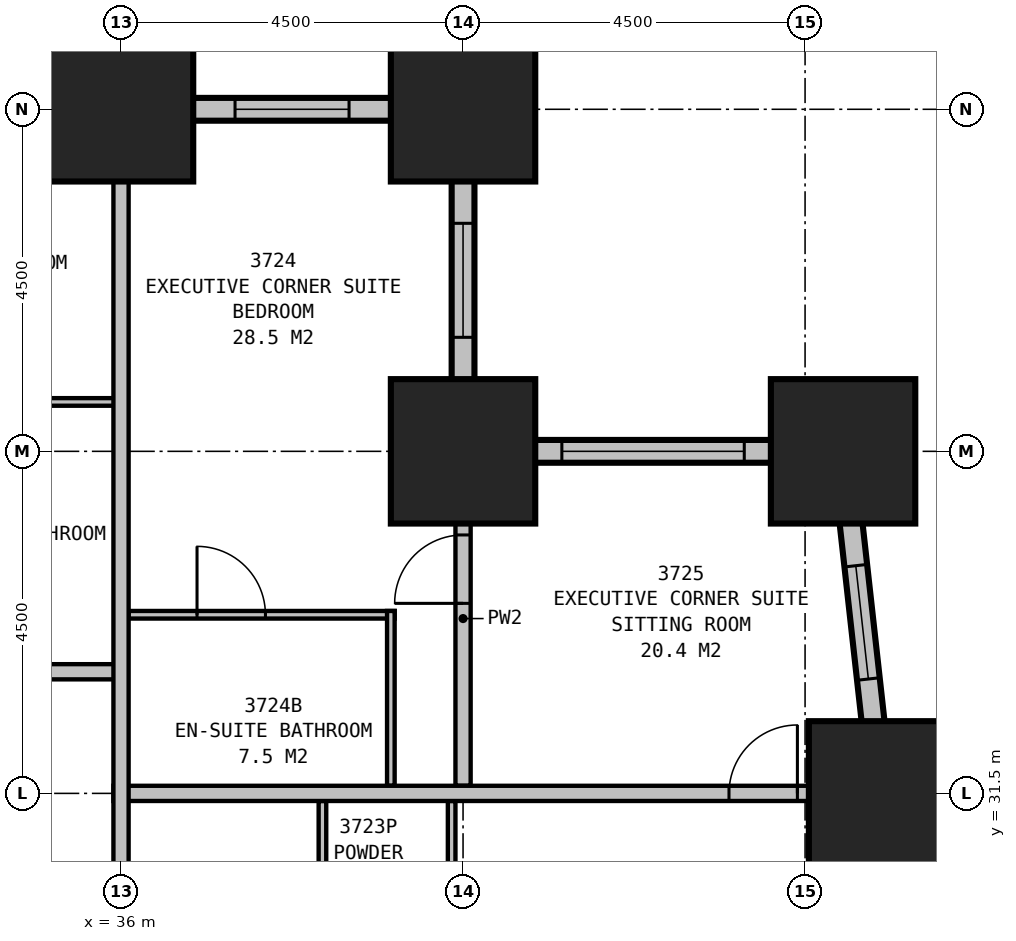
"""IFC4 building model, lengths in metres.
Left out: names, types, materials, properties, quantities, classifications, styles, units other than length and angle.
Written with IfcOpenShell. Run it as: python <this file> out.ifc"""

import sys

from ifc_helpers import new_model, si_unit, direction, frame, frame_2d, origin, origin_2d, place, context, subcontext, project, spatial, rectangle, extrude, element, fill, save


model = new_model("IFC4")
c1 = context("Model", 3, precision=1e-05, world=origin(), true_north=direction((0.0, 1.0)))
c2 = subcontext(c1, "Body", "Model", "MODEL_VIEW")
j1 = project(units=[si_unit("LENGTHUNIT", "METRE"), si_unit("PLANEANGLEUNIT", "RADIAN")], contexts=[c1])
p1 = place(None, origin())
s1 = spatial("IfcSite", under=j1, at=p1, CompositionType="ELEMENT")
p2 = place(p1, origin())
s2 = spatial("IfcBuilding", under=s1, at=p2, CompositionType="ELEMENT")
p3 = place(p2, frame((0.0, 0.0, 142.4)))
s3 = spatial("IfcBuildingStorey", under=s2, at=p3, CompositionType="ELEMENT", Elevation=142.4)
for number, where, z_axis, x_axis in (
    (1, (46.0, 31.5, 0.0), (0.0, 0.0, 1.0), (1.0, 0.0, 0.0)),
    (2, (45.5, 36.0, 0.0), (0.0, 0.0, 1.0), (1.0, 0.0, 0.0)),
    (3, (40.5, 36.0, 0.0), (0.0, 0.0, 1.0), (1.0, 0.0, 0.0)),
    (4, (40.5, 40.5, 0.0), (0.0, 0.0, 1.0), (1.0, 0.0, 0.0)),
    (5, (36.0, 40.5, 0.0), (0.0, 0.0, 1.0), (1.0, 0.0, 0.0)),
):
    element("IfcColumn", number, at=place(p3, frame(where, z_axis=z_axis, x_axis=x_axis)), inside=s3, PredefinedType="COLUMN", context=c2, shape_type="SweptSolid", body=[
        extrude(rectangle(XDim=1.9, YDim=1.9, at=origin_2d()), origin(), (0.0, 0.0, 1.0), 3.5),
    ])
p4 = place(p3, frame((49.017, 4.351, 0.0), z_axis=(0.0, 0.0, 1.0), x_axis=(-0.110433201132, 0.993883548555, 0.0)))
e6 = element("IfcWall", 6, at=p4, inside=s3, PredefinedType="STANDARD", context=c2, shape_type="SweptSolid", body=[
    extrude(rectangle(XDim=31.994, YDim=0.3, at=frame_2d((15.997, 0.0))), origin(), (0.0, 0.0, 1.0), 2.1),
])
p5 = place(p4, frame((1.664, 0.0, 0.5)))
e7 = element("IfcOpeningElement", 7, at=p5, cuts=e6, PredefinedType="OPENING", context=c2, shape_type="SweptSolid", body=[
    extrude(rectangle(XDim=1.5, YDim=1.4, at=frame_2d((0.75, 0.7))), frame((0.0, 0.16, 0.0), z_axis=(0.0, -1.0, 0.0), x_axis=(1.0, 0.0, 0.0)), (0.0, 0.0, 1.0), 0.32),
])
p6 = place(p4, frame((6.192, 0.0, 0.5)))
e8 = element("IfcOpeningElement", 8, at=p6, cuts=e6, PredefinedType="OPENING", context=c2, shape_type="SweptSolid", body=[
    extrude(rectangle(XDim=1.5, YDim=1.4, at=frame_2d((0.75, 0.7))), frame((0.0, 0.16, 0.0), z_axis=(0.0, -1.0, 0.0), x_axis=(1.0, 0.0, 0.0)), (0.0, 0.0, 1.0), 0.32),
])
p7 = place(p4, frame((10.719, 0.0, 0.5)))
e9 = element("IfcOpeningElement", 9, at=p7, cuts=e6, PredefinedType="OPENING", context=c2, shape_type="SweptSolid", body=[
    extrude(rectangle(XDim=1.5, YDim=1.4, at=frame_2d((0.75, 0.7))), frame((0.0, 0.16, 0.0), z_axis=(0.0, -1.0, 0.0), x_axis=(1.0, 0.0, 0.0)), (0.0, 0.0, 1.0), 0.32),
])
p8 = place(p4, frame((15.247, 0.0, 0.5)))
e10 = element("IfcOpeningElement", 10, at=p8, cuts=e6, PredefinedType="OPENING", context=c2, shape_type="SweptSolid", body=[
    extrude(rectangle(XDim=1.5, YDim=1.4, at=frame_2d((0.75, 0.7))), frame((0.0, 0.16, 0.0), z_axis=(0.0, -1.0, 0.0), x_axis=(1.0, 0.0, 0.0)), (0.0, 0.0, 1.0), 0.32),
])
p9 = place(p4, frame((19.775, 0.0, 0.5)))
e11 = element("IfcOpeningElement", 11, at=p9, cuts=e6, PredefinedType="OPENING", context=c2, shape_type="SweptSolid", body=[
    extrude(rectangle(XDim=1.5, YDim=1.4, at=frame_2d((0.75, 0.7))), frame((0.0, 0.16, 0.0), z_axis=(0.0, -1.0, 0.0), x_axis=(1.0, 0.0, 0.0)), (0.0, 0.0, 1.0), 0.32),
])
p10 = place(p4, frame((24.302, 0.0, 0.5)))
e12 = element("IfcOpeningElement", 12, at=p10, cuts=e6, PredefinedType="OPENING", context=c2, shape_type="SweptSolid", body=[
    extrude(rectangle(XDim=1.5, YDim=1.4, at=frame_2d((0.75, 0.7))), frame((0.0, 0.16, 0.0), z_axis=(0.0, -1.0, 0.0), x_axis=(1.0, 0.0, 0.0)), (0.0, 0.0, 1.0), 0.32),
])
p11 = place(p4, frame((28.83, 0.0, 0.5)))
e13 = element("IfcOpeningElement", 13, at=p11, cuts=e6, PredefinedType="OPENING", context=c2, shape_type="SweptSolid", body=[
    extrude(rectangle(XDim=1.5, YDim=1.4, at=frame_2d((0.75, 0.7))), frame((0.0, 0.16, 0.0), z_axis=(0.0, -1.0, 0.0), x_axis=(1.0, 0.0, 0.0)), (0.0, 0.0, 1.0), 0.32),
])
p12 = place(p3, frame((45.65, 36.0, 0.0), z_axis=(0.0, 0.0, 1.0), x_axis=(-1.0, 0.0, 0.0)))
e14 = element("IfcWall", 14, at=p12, inside=s3, PredefinedType="STANDARD", context=c2, shape_type="SweptSolid", body=[
    extrude(rectangle(XDim=5.3, YDim=0.3, at=frame_2d((2.65, 0.0))), origin(), (0.0, 0.0, 1.0), 2.1),
])
p13 = place(p12, frame((1.45, 0.0, 0.5)))
e15 = element("IfcOpeningElement", 15, at=p13, cuts=e14, PredefinedType="OPENING", context=c2, shape_type="SweptSolid", body=[
    extrude(rectangle(XDim=2.4, YDim=1.4, at=frame_2d((1.2, 0.7))), frame((0.0, 0.16, 0.0), z_axis=(0.0, -1.0, 0.0), x_axis=(1.0, 0.0, 0.0)), (0.0, 0.0, 1.0), 0.32),
])
p14 = place(p3, frame((40.5, 35.85, 0.0), z_axis=(0.0, 0.0, 1.0), x_axis=(0.0, 1.0, 0.0)))
e16 = element("IfcWall", 16, at=p14, inside=s3, PredefinedType="STANDARD", context=c2, shape_type="SweptSolid", body=[
    extrude(rectangle(XDim=4.8, YDim=0.3, at=frame_2d((2.4, 0.0))), origin(), (0.0, 0.0, 1.0), 2.1),
])
p15 = place(p14, frame((1.65, 0.0, 0.5)))
e17 = element("IfcOpeningElement", 17, at=p15, cuts=e16, PredefinedType="OPENING", context=c2, shape_type="SweptSolid", body=[
    extrude(rectangle(XDim=1.5, YDim=1.4, at=frame_2d((0.75, 0.7))), frame((0.0, 0.16, 0.0), z_axis=(0.0, -1.0, 0.0), x_axis=(1.0, 0.0, 0.0)), (0.0, 0.0, 1.0), 0.32),
])
p16 = place(p3, frame((40.65, 40.5, 0.0), z_axis=(0.0, 0.0, 1.0), x_axis=(-1.0, 0.0, 0.0)))
e18 = element("IfcWall", 18, at=p16, inside=s3, PredefinedType="STANDARD", context=c2, shape_type="SweptSolid", body=[
    extrude(rectangle(XDim=31.8, YDim=0.3, at=frame_2d((15.9, 0.0))), origin(), (0.0, 0.0, 1.0), 2.1),
])
p17 = place(p16, frame((1.65, 0.0, 0.5)))
e19 = element("IfcOpeningElement", 19, at=p17, cuts=e18, PredefinedType="OPENING", context=c2, shape_type="SweptSolid", body=[
    extrude(rectangle(XDim=1.5, YDim=1.4, at=frame_2d((0.75, 0.7))), frame((0.0, 0.16, 0.0), z_axis=(0.0, -1.0, 0.0), x_axis=(1.0, 0.0, 0.0)), (0.0, 0.0, 1.0), 0.32),
])
p18 = place(p16, frame((6.15, 0.0, 0.5)))
e20 = element("IfcOpeningElement", 20, at=p18, cuts=e18, PredefinedType="OPENING", context=c2, shape_type="SweptSolid", body=[
    extrude(rectangle(XDim=1.5, YDim=1.4, at=frame_2d((0.75, 0.7))), frame((0.0, 0.16, 0.0), z_axis=(0.0, -1.0, 0.0), x_axis=(1.0, 0.0, 0.0)), (0.0, 0.0, 1.0), 0.32),
])
p19 = place(p16, frame((10.65, 0.0, 0.5)))
e21 = element("IfcOpeningElement", 21, at=p19, cuts=e18, PredefinedType="OPENING", context=c2, shape_type="SweptSolid", body=[
    extrude(rectangle(XDim=1.5, YDim=1.4, at=frame_2d((0.75, 0.7))), frame((0.0, 0.16, 0.0), z_axis=(0.0, -1.0, 0.0), x_axis=(1.0, 0.0, 0.0)), (0.0, 0.0, 1.0), 0.32),
])
p20 = place(p16, frame((15.15, 0.0, 0.5)))
e22 = element("IfcOpeningElement", 22, at=p20, cuts=e18, PredefinedType="OPENING", context=c2, shape_type="SweptSolid", body=[
    extrude(rectangle(XDim=1.5, YDim=1.4, at=frame_2d((0.75, 0.7))), frame((0.0, 0.16, 0.0), z_axis=(0.0, -1.0, 0.0), x_axis=(1.0, 0.0, 0.0)), (0.0, 0.0, 1.0), 0.32),
])
p21 = place(p16, frame((19.65, 0.0, 0.5)))
e23 = element("IfcOpeningElement", 23, at=p21, cuts=e18, PredefinedType="OPENING", context=c2, shape_type="SweptSolid", body=[
    extrude(rectangle(XDim=1.5, YDim=1.4, at=frame_2d((0.75, 0.7))), frame((0.0, 0.16, 0.0), z_axis=(0.0, -1.0, 0.0), x_axis=(1.0, 0.0, 0.0)), (0.0, 0.0, 1.0), 0.32),
])
p22 = place(p16, frame((24.15, 0.0, 0.5)))
e24 = element("IfcOpeningElement", 24, at=p22, cuts=e18, PredefinedType="OPENING", context=c2, shape_type="SweptSolid", body=[
    extrude(rectangle(XDim=1.5, YDim=1.4, at=frame_2d((0.75, 0.7))), frame((0.0, 0.16, 0.0), z_axis=(0.0, -1.0, 0.0), x_axis=(1.0, 0.0, 0.0)), (0.0, 0.0, 1.0), 0.32),
])
p23 = place(p16, frame((28.65, 0.0, 0.5)))
e25 = element("IfcOpeningElement", 25, at=p23, cuts=e18, PredefinedType="OPENING", context=c2, shape_type="SweptSolid", body=[
    extrude(rectangle(XDim=1.5, YDim=1.4, at=frame_2d((0.75, 0.7))), frame((0.0, 0.16, 0.0), z_axis=(0.0, -1.0, 0.0), x_axis=(1.0, 0.0, 0.0)), (0.0, 0.0, 1.0), 0.32),
])
p24 = place(p3, frame((13.5, 33.1, 0.0), z_axis=(0.0, 0.0, 1.0), x_axis=(1.0, 0.0, 0.0)))
e26 = element("IfcWall", 26, at=p24, inside=s3, PredefinedType="PARTITIONING", context=c2, shape_type="SweptSolid", body=[
    extrude(rectangle(XDim=22.5, YDim=0.2, at=frame_2d((11.25, 0.0))), origin(), (0.0, 0.0, 1.0), 3.25),
])
p25 = place(p24, frame((0.85, 0.0, 0.0)))
e27 = element("IfcOpeningElement", 27, at=p25, cuts=e26, PredefinedType="OPENING", context=c2, shape_type="SweptSolid", body=[
    extrude(rectangle(XDim=0.9, YDim=2.1, at=frame_2d((0.45, 1.05))), frame((0.0, 0.11, 0.0), z_axis=(0.0, -1.0, 0.0), x_axis=(1.0, 0.0, 0.0)), (0.0, 0.0, 1.0), 0.22),
])
p26 = place(p24, frame((10.7, 0.0, 0.0)))
e28 = element("IfcOpeningElement", 28, at=p26, cuts=e26, PredefinedType="OPENING", context=c2, shape_type="SweptSolid", body=[
    extrude(rectangle(XDim=1.0, YDim=2.1, at=frame_2d((0.5, 1.05))), frame((0.0, 0.11, 0.0), z_axis=(0.0, -1.0, 0.0), x_axis=(1.0, 0.0, 0.0)), (0.0, 0.0, 1.0), 0.22),
])
p27 = place(p24, frame((15.15, 0.0, 0.0)))
e29 = element("IfcOpeningElement", 29, at=p27, cuts=e26, PredefinedType="OPENING", context=c2, shape_type="SweptSolid", body=[
    extrude(rectangle(XDim=0.9, YDim=2.1, at=frame_2d((0.45, 1.05))), frame((0.0, 0.11, 0.0), z_axis=(0.0, -1.0, 0.0), x_axis=(1.0, 0.0, 0.0)), (0.0, 0.0, 1.0), 0.22),
])
p28 = place(p3, frame((33.0, 36.65, 0.0), z_axis=(0.0, 0.0, 1.0), x_axis=(1.0, 0.0, 0.0)))
e30 = element("IfcWall", 30, at=p28, inside=s3, PredefinedType="PLUMBINGWALL", context=c2, shape_type="SweptSolid", body=[
    extrude(rectangle(XDim=3.0, YDim=0.1, at=frame_2d((1.5, 0.0))), origin(), (0.0, 0.0, 1.0), 3.25),
])
p29 = place(p3, frame((36.0, 29.3, 0.0), z_axis=(0.0, 0.0, 1.0), x_axis=(0.0, 1.0, 0.0)))
e31 = element("IfcWall", 31, at=p29, inside=s3, PredefinedType="PARTITIONING", context=c2, shape_type="SweptSolid", body=[
    extrude(rectangle(XDim=11.2, YDim=0.2, at=frame_2d((5.6, 0.0))), origin(), (0.0, 0.0, 1.0), 2.2),
])
p30 = place(p3, frame((35.9, 31.5, 0.0), z_axis=(0.0, 0.0, 1.0), x_axis=(1.0, 0.0, 0.0)))
e32 = element("IfcWall", 32, at=p30, inside=s3, PredefinedType="PARTITIONING", context=c2, shape_type="SweptSolid", body=[
    extrude(rectangle(XDim=10.099, YDim=0.2, at=frame_2d((5.05, 0.0))), origin(), (0.0, 0.0, 1.0), 3.25),
])
p31 = place(p30, frame((8.099, 0.0, 0.0)))
e33 = element("IfcOpeningElement", 33, at=p31, cuts=e32, PredefinedType="OPENING", context=c2, shape_type="SweptSolid", body=[
    extrude(rectangle(XDim=0.9, YDim=2.1, at=frame_2d((0.45, 1.05))), frame((0.0, 0.11, 0.0), z_axis=(0.0, -1.0, 0.0), x_axis=(1.0, 0.0, 0.0)), (0.0, 0.0, 1.0), 0.22),
])
p32 = place(p3, frame((40.35, 31.4, 0.0), z_axis=(0.0, 0.0, 1.0), x_axis=(0.0, -1.0, 0.0)))
e34 = element("IfcWall", 34, at=p32, inside=s3, PredefinedType="PLUMBINGWALL", context=c2, shape_type="SweptSolid", body=[
    extrude(rectangle(XDim=2.0, YDim=0.1, at=frame_2d((1.0, 0.0))), origin(), (0.0, 0.0, 1.0), 2.2),
])
p33 = place(p3, frame((38.65, 31.4, 0.0), z_axis=(0.0, 0.0, 1.0), x_axis=(0.0, -1.0, 0.0)))
e35 = element("IfcWall", 35, at=p33, inside=s3, PredefinedType="PLUMBINGWALL", context=c2, shape_type="SweptSolid", body=[
    extrude(rectangle(XDim=2.0, YDim=0.1, at=frame_2d((1.0, 0.0))), origin(), (0.0, 0.0, 1.0), 3.25),
])
p34 = place(p3, frame((40.5, 31.6, 0.0), z_axis=(0.0, 0.0, 1.0), x_axis=(0.0, 1.0, 0.0)))
e36 = element("IfcWall", 36, at=p34, inside=s3, PredefinedType="PARTITIONING", context=c2, shape_type="SweptSolid", body=[
    extrude(rectangle(XDim=4.4, YDim=0.2, at=frame_2d((2.2, 0.0))), origin(), (0.0, 0.0, 1.0), 2.2),
])
p35 = place(p34, frame((2.4, 0.0, 0.0)))
e37 = element("IfcOpeningElement", 37, at=p35, cuts=e36, PredefinedType="OPENING", context=c2, shape_type="SweptSolid", body=[
    extrude(rectangle(XDim=0.9, YDim=2.1, at=frame_2d((0.45, 1.05))), frame((0.0, 0.11, 0.0), z_axis=(0.0, -1.0, 0.0), x_axis=(1.0, 0.0, 0.0)), (0.0, 0.0, 1.0), 0.22),
])
p36 = place(p3, frame((39.55, 31.6, 0.0), z_axis=(0.0, 0.0, 1.0), x_axis=(0.0, 1.0, 0.0)))
e38 = element("IfcWall", 38, at=p36, inside=s3, PredefinedType="PLUMBINGWALL", context=c2, shape_type="SweptSolid", body=[
    extrude(rectangle(XDim=2.3, YDim=0.1, at=frame_2d((1.15, 0.0))), origin(), (0.0, 0.0, 1.0), 3.25),
])
p37 = place(p3, frame((36.1, 33.85, 0.0), z_axis=(0.0, 0.0, 1.0), x_axis=(1.0, 0.0, 0.0)))
e39 = element("IfcWall", 39, at=p37, inside=s3, PredefinedType="PLUMBINGWALL", context=c2, shape_type="SweptSolid", body=[
    extrude(rectangle(XDim=3.5, YDim=0.1, at=frame_2d((1.75, 0.0))), origin(), (0.0, 0.0, 1.0), 3.25),
])
p38 = place(p37, frame((0.9, 0.0, 0.0)))
e40 = element("IfcOpeningElement", 40, at=p38, cuts=e39, PredefinedType="OPENING", context=c2, shape_type="SweptSolid", body=[
    extrude(rectangle(XDim=0.9, YDim=2.1, at=frame_2d((0.45, 1.05))), frame((0.0, 0.06, 0.0), z_axis=(0.0, -1.0, 0.0), x_axis=(1.0, 0.0, 0.0)), (0.0, 0.0, 1.0), 0.12),
])
p39 = place(p11, origin())
e41 = element("IfcWindow", 41, at=p39, inside=s3, PartitioningType="SINGLE_PANEL", PredefinedType="WINDOW", context=c2, shape_type="SweptSolid", body=[
    extrude(rectangle(XDim=1.5, YDim=1.4, at=frame_2d((0.75, 0.7))), frame((0.0, 0.03, 0.0), z_axis=(0.0, -1.0, 0.0), x_axis=(1.0, 0.0, 0.0)), (0.0, 0.0, 1.0), 0.06),
])
fill(e13, e41)
p40 = place(p13, origin())
e42 = element("IfcWindow", 42, at=p40, inside=s3, PartitioningType="SINGLE_PANEL", PredefinedType="WINDOW", context=c2, shape_type="SweptSolid", body=[
    extrude(rectangle(XDim=2.4, YDim=1.4, at=frame_2d((1.2, 0.7))), frame((0.0, 0.03, 0.0), z_axis=(0.0, -1.0, 0.0), x_axis=(1.0, 0.0, 0.0)), (0.0, 0.0, 1.0), 0.06),
])
fill(e15, e42)
p41 = place(p15, origin())
e43 = element("IfcWindow", 43, at=p41, inside=s3, PartitioningType="SINGLE_PANEL", PredefinedType="WINDOW", context=c2, shape_type="SweptSolid", body=[
    extrude(rectangle(XDim=1.5, YDim=1.4, at=frame_2d((0.75, 0.7))), frame((0.0, 0.03, 0.0), z_axis=(0.0, -1.0, 0.0), x_axis=(1.0, 0.0, 0.0)), (0.0, 0.0, 1.0), 0.06),
])
fill(e17, e43)
p42 = place(p17, origin())
e44 = element("IfcWindow", 44, at=p42, inside=s3, PartitioningType="SINGLE_PANEL", PredefinedType="WINDOW", context=c2, shape_type="SweptSolid", body=[
    extrude(rectangle(XDim=1.5, YDim=1.4, at=frame_2d((0.75, 0.7))), frame((0.0, 0.03, 0.0), z_axis=(0.0, -1.0, 0.0), x_axis=(1.0, 0.0, 0.0)), (0.0, 0.0, 1.0), 0.06),
])
fill(e19, e44)
p43 = place(p31, origin())
e45 = element("IfcDoor", 45, at=p43, inside=s3, OperationType="SINGLE_SWING_RIGHT", PredefinedType="DOOR", context=c2, shape_type="SweptSolid", body=[
    extrude(rectangle(XDim=0.9, YDim=2.1, at=frame_2d((0.45, 1.05))), frame((0.0, 0.025, 0.0), z_axis=(0.0, -1.0, 0.0), x_axis=(1.0, 0.0, 0.0)), (0.0, 0.0, 1.0), 0.05),
])
fill(e33, e45)
p44 = place(p35, origin())
e46 = element("IfcDoor", 46, at=p44, inside=s3, OperationType="SINGLE_SWING_LEFT", PredefinedType="DOOR", context=c2, shape_type="SweptSolid", body=[
    extrude(rectangle(XDim=0.9, YDim=2.1, at=frame_2d((0.45, 1.05))), frame((0.0, 0.025, 0.0), z_axis=(0.0, -1.0, 0.0), x_axis=(1.0, 0.0, 0.0)), (0.0, 0.0, 1.0), 0.05),
])
fill(e37, e46)
p45 = place(p38, origin())
e47 = element("IfcDoor", 47, at=p45, inside=s3, OperationType="SINGLE_SWING_LEFT", PredefinedType="DOOR", context=c2, shape_type="SweptSolid", body=[
    extrude(rectangle(XDim=0.9, YDim=2.1, at=frame_2d((0.45, 1.05))), frame((0.0, 0.025, 0.0), z_axis=(0.0, -1.0, 0.0), x_axis=(1.0, 0.0, 0.0)), (0.0, 0.0, 1.0), 0.05),
])
fill(e40, e47)
save(model, sys.argv[1])
